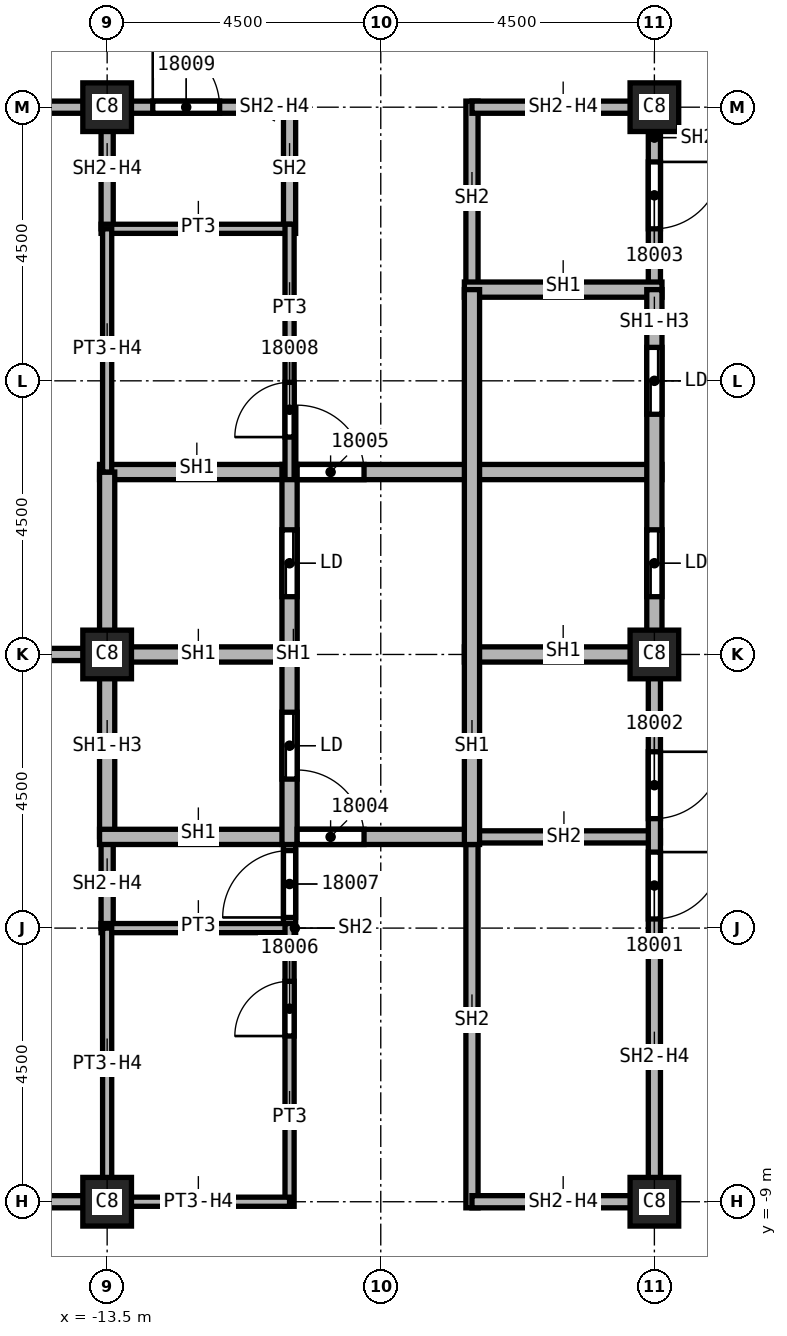
"""IFC4 building model, lengths in metres.
Left out: names, types, materials, properties, quantities, classifications, styles, units other than length and angle.
Written with IfcOpenShell. Run it as: python <this file> out.ifc"""

import sys

from ifc_helpers import new_model, si_unit, direction, frame, frame_2d, origin, origin_2d, place, context, subcontext, project, spatial, rectangle, extrude, element, fill, save


model = new_model("IFC4")
c1 = context("Model", 3, precision=1e-05, world=origin(), true_north=direction((0.0, 1.0)))
c2 = subcontext(c1, "Body", "Model", "MODEL_VIEW")
j1 = project(units=[si_unit("LENGTHUNIT", "METRE"), si_unit("PLANEANGLEUNIT", "RADIAN")], contexts=[c1])
p1 = place(None, origin())
s1 = spatial("IfcSite", under=j1, at=p1, CompositionType="ELEMENT")
p2 = place(p1, origin())
s2 = spatial("IfcBuilding", under=s1, at=p2, CompositionType="ELEMENT")
p3 = place(p2, frame((0.0, 0.0, 266.0)))
s3 = spatial("IfcBuildingStorey", under=s2, at=p3, CompositionType="ELEMENT", Elevation=266.0)
for number, where, z_axis, x_axis in (
    (1, (-4.5, 0.0, 0.0), (0.0, 0.0, 1.0), (1.0, 0.0, 0.0)),
    (2, (-4.5, 9.0, 0.0), (0.0, 0.0, 1.0), (1.0, 0.0, 0.0)),
    (3, (-4.5, -9.0, 0.0), (0.0, 0.0, 1.0), (1.0, 0.0, 0.0)),
    (4, (-13.5, 0.0, 0.0), (0.0, 0.0, 1.0), (1.0, 0.0, 0.0)),
    (5, (-13.5, 9.0, 0.0), (0.0, 0.0, 1.0), (1.0, 0.0, 0.0)),
    (6, (-13.5, -9.0, 0.0), (0.0, 0.0, 1.0), (1.0, 0.0, 0.0)),
):
    element("IfcColumn", number, at=place(p3, frame(where, z_axis=z_axis, x_axis=x_axis)), inside=s3, PredefinedType="COLUMN", context=c2, shape_type="SweptSolid", body=[
        extrude(rectangle(XDim=0.8, YDim=0.8, at=origin_2d()), origin(), (0.0, 0.0, 1.0), 3.72),
    ])
for number, where, z_axis, x_axis in (
    (7, (-18.0, -9.0, 0.0), (0.0, 0.0, 1.0), (1.0, 0.0, 0.0)),
    (8, (-18.0, 0.0, 0.0), (0.0, 0.0, 1.0), (1.0, 0.0, 0.0)),
    (9, (-13.5, 9.0, 0.0), (0.0, 0.0, 1.0), (-1.0, 0.0, 0.0)),
):
    element("IfcWall", number, at=place(p3, frame(where, z_axis=z_axis, x_axis=x_axis)), inside=s3, PredefinedType="PARTITIONING", context=c2, shape_type="SweptSolid", body=[
        extrude(rectangle(XDim=4.5, YDim=0.2, at=frame_2d((2.25, 0.0))), origin(), (0.0, 0.0, 1.0), 3.72),
    ])
p4 = place(p3, frame((-13.6, 9.0, 0.0), z_axis=(0.0, 0.0, 1.0), x_axis=(1.0, 0.0, 0.0)))
e10 = element("IfcWall", 10, at=p4, inside=s3, PredefinedType="SOLIDWALL", context=c2, shape_type="SweptSolid", body=[
    extrude(rectangle(XDim=3.1, YDim=0.2, at=frame_2d((1.55, 0.0))), origin(), (0.0, 0.0, 1.0), 3.042),
])
p5 = place(p4, frame((0.85, 0.0, 0.0)))
e11 = element("IfcOpeningElement", 11, at=p5, cuts=e10, PredefinedType="OPENING", context=c2, shape_type="SweptSolid", body=[
    extrude(rectangle(XDim=1.1, YDim=2.1, at=frame_2d((0.55, 1.05))), frame((0.0, 0.1, 0.0), z_axis=(0.0, -1.0, 0.0), x_axis=(1.0, 0.0, 0.0)), (0.0, 0.0, 1.0), 0.2),
])
p6 = place(p3, frame((-13.5, -4.5, 0.0), z_axis=(0.0, 0.0, 1.0), x_axis=(0.0, 1.0, 0.0)))
e12 = element("IfcWall", 12, at=p6, inside=s3, PredefinedType="SOLIDWALL", context=c2, shape_type="SweptSolid", body=[
    extrude(rectangle(XDim=1.5, YDim=0.2, at=frame_2d((0.75, 0.0))), origin(), (0.0, 0.0, 1.0), 3.042),
])
p7 = place(p3, frame((-13.5, 7.0, 0.0), z_axis=(0.0, 0.0, 1.0), x_axis=(0.0, 1.0, 0.0)))
e13 = element("IfcWall", 13, at=p7, inside=s3, PredefinedType="SOLIDWALL", context=c2, shape_type="SweptSolid", body=[
    extrude(rectangle(XDim=2.1, YDim=0.2, at=frame_2d((1.05, 0.0))), origin(), (0.0, 0.0, 1.0), 3.042),
])
p8 = place(p3, frame((-10.5, -4.575, 0.0), z_axis=(0.0, 0.0, 1.0), x_axis=(0.0, 1.0, 0.0)))
e14 = element("IfcWall", 14, at=p8, inside=s3, PredefinedType="SOLIDWALL", context=c2, shape_type="SweptSolid", body=[
    extrude(rectangle(XDim=1.7, YDim=0.2, at=frame_2d((0.85, 0.0))), origin(), (0.0, 0.0, 1.0), 3.72),
])
p9 = place(p8, frame((0.25, 0.0, 0.0)))
e15 = element("IfcOpeningElement", 15, at=p9, cuts=e14, PredefinedType="OPENING", context=c2, shape_type="SweptSolid", body=[
    extrude(rectangle(XDim=1.1, YDim=2.1, at=frame_2d((0.55, 1.05))), frame((0.0, 0.1, 0.0), z_axis=(0.0, -1.0, 0.0), x_axis=(1.0, 0.0, 0.0)), (0.0, 0.0, 1.0), 0.2),
])
p10 = place(p3, frame((-10.5, 6.925, 0.0), z_axis=(0.0, 0.0, 1.0), x_axis=(0.0, 1.0, 0.0)))
e16 = element("IfcWall", 16, at=p10, inside=s3, PredefinedType="SOLIDWALL", context=c2, shape_type="SweptSolid", body=[
    extrude(rectangle(XDim=2.175, YDim=0.2, at=frame_2d((1.087, 0.0))), origin(), (0.0, 0.0, 1.0), 3.72),
])
p11 = place(p3, frame((-7.625, -3.0, 0.0), z_axis=(0.0, 0.0, 1.0), x_axis=(1.0, 0.0, 0.0)))
e17 = element("IfcWall", 17, at=p11, inside=s3, PredefinedType="SOLIDWALL", context=c2, shape_type="SweptSolid", body=[
    extrude(rectangle(XDim=3.225, YDim=0.2, at=frame_2d((1.613, 0.0))), origin(), (0.0, 0.0, 1.0), 3.72),
])
p12 = place(p3, frame((-7.5, -9.1, 0.0), z_axis=(0.0, 0.0, 1.0), x_axis=(0.0, 1.0, 0.0)))
e18 = element("IfcWall", 18, at=p12, inside=s3, PredefinedType="SOLIDWALL", context=c2, shape_type="SweptSolid", body=[
    extrude(rectangle(XDim=6.225, YDim=0.2, at=frame_2d((3.113, 0.0))), origin(), (0.0, 0.0, 1.0), 3.72),
])
p13 = place(p3, frame((-7.5, 6.0, 0.0), z_axis=(0.0, 0.0, 1.0), x_axis=(0.0, 1.0, 0.0)))
e19 = element("IfcWall", 19, at=p13, inside=s3, PredefinedType="SOLIDWALL", context=c2, shape_type="SweptSolid", body=[
    extrude(rectangle(XDim=3.1, YDim=0.2, at=frame_2d((1.55, 0.0))), origin(), (0.0, 0.0, 1.0), 3.72),
])
for number, where, z_axis, x_axis in (
    (20, (-7.5, 9.0, 0.0), (0.0, 0.0, 1.0), (1.0, 0.0, 0.0)),
    (21, (-4.5, -9.0, 0.0), (0.0, 0.0, 1.0), (-1.0, 0.0, 0.0)),
):
    element("IfcWall", number, at=place(p3, frame(where, z_axis=z_axis, x_axis=x_axis)), inside=s3, PredefinedType="SOLIDWALL", context=c2, shape_type="SweptSolid", body=[
        extrude(rectangle(XDim=3.0, YDim=0.2, at=frame_2d((1.5, 0.0))), origin(), (0.0, 0.0, 1.0), 3.042),
    ])
p14 = place(p3, frame((-4.5, 0.0, 0.0), z_axis=(0.0, 0.0, 1.0), x_axis=(0.0, -1.0, 0.0)))
e22 = element("IfcWall", 22, at=p14, inside=s3, PredefinedType="SOLIDWALL", context=c2, shape_type="SweptSolid", body=[
    extrude(rectangle(XDim=9.1, YDim=0.2, at=frame_2d((4.55, 0.0))), origin(), (0.0, 0.0, 1.0), 3.042),
])
p15 = place(p14, frame((3.25, 0.0, 0.0)))
e23 = element("IfcOpeningElement", 23, at=p15, cuts=e22, PredefinedType="OPENING", context=c2, shape_type="SweptSolid", body=[
    extrude(rectangle(XDim=1.1, YDim=2.1, at=frame_2d((0.55, 1.05))), frame((0.0, 0.1, 0.0), z_axis=(0.0, -1.0, 0.0), x_axis=(1.0, 0.0, 0.0)), (0.0, 0.0, 1.0), 0.2),
])
p16 = place(p14, frame((1.6, 0.0, 0.0)))
e24 = element("IfcOpeningElement", 24, at=p16, cuts=e22, PredefinedType="OPENING", context=c2, shape_type="SweptSolid", body=[
    extrude(rectangle(XDim=1.1, YDim=2.1, at=frame_2d((0.55, 1.05))), frame((0.0, 0.1, 0.0), z_axis=(0.0, -1.0, 0.0), x_axis=(1.0, 0.0, 0.0)), (0.0, 0.0, 1.0), 0.2),
])
p17 = place(p3, frame((-4.5, 9.1, 0.0), z_axis=(0.0, 0.0, 1.0), x_axis=(0.0, -1.0, 0.0)))
e25 = element("IfcWall", 25, at=p17, inside=s3, PredefinedType="SOLIDWALL", context=c2, shape_type="SweptSolid", body=[
    extrude(rectangle(XDim=3.1, YDim=0.2, at=frame_2d((1.55, 0.0))), origin(), (0.0, 0.0, 1.0), 3.042),
])
p18 = place(p17, frame((1.0, 0.0, 0.0)))
e26 = element("IfcOpeningElement", 26, at=p18, cuts=e25, PredefinedType="OPENING", context=c2, shape_type="SweptSolid", body=[
    extrude(rectangle(XDim=1.1, YDim=2.1, at=frame_2d((0.55, 1.05))), frame((0.0, 0.1, 0.0), z_axis=(0.0, -1.0, 0.0), x_axis=(1.0, 0.0, 0.0)), (0.0, 0.0, 1.0), 0.2),
])
p19 = place(p3, frame((-13.625, 0.0, 0.0), z_axis=(0.0, 0.0, 1.0), x_axis=(1.0, 0.0, 0.0)))
e27 = element("IfcWall", 27, at=p19, inside=s3, PredefinedType="SOLIDWALL", context=c2, shape_type="SweptSolid", body=[
    extrude(rectangle(XDim=3.125, YDim=0.25, at=frame_2d((1.562, 0.0))), origin(), (0.0, 0.0, 1.0), 3.72),
])
p20 = place(p3, frame((-13.625, 3.0, 0.0), z_axis=(0.0, 0.0, 1.0), x_axis=(1.0, 0.0, 0.0)))
e28 = element("IfcWall", 28, at=p20, inside=s3, PredefinedType="SOLIDWALL", context=c2, shape_type="SweptSolid", body=[
    extrude(rectangle(XDim=9.25, YDim=0.25, at=frame_2d((4.625, 0.0))), origin(), (0.0, 0.0, 1.0), 3.72),
])
p21 = place(p20, frame((3.25, 0.0, 0.0)))
e29 = element("IfcOpeningElement", 29, at=p21, cuts=e28, PredefinedType="OPENING", context=c2, shape_type="SweptSolid", body=[
    extrude(rectangle(XDim=1.1, YDim=2.1, at=frame_2d((0.55, 1.05))), frame((0.0, 0.125, 0.0), z_axis=(0.0, -1.0, 0.0), x_axis=(1.0, 0.0, 0.0)), (0.0, 0.0, 1.0), 0.25),
])
p22 = place(p3, frame((-13.5, -3.0, 0.0), z_axis=(0.0, 0.0, 1.0), x_axis=(0.0, 1.0, 0.0)))
e30 = element("IfcWall", 30, at=p22, inside=s3, PredefinedType="SOLIDWALL", context=c2, shape_type="SweptSolid", body=[
    extrude(rectangle(XDim=6.0, YDim=0.25, at=frame_2d((3.0, 0.0))), origin(), (0.0, 0.0, 1.0), 3.042),
])
p23 = place(p3, frame((-13.625, -3.0, 0.0), z_axis=(0.0, 0.0, 1.0), x_axis=(1.0, 0.0, 0.0)))
e31 = element("IfcWall", 31, at=p23, inside=s3, PredefinedType="SOLIDWALL", context=c2, shape_type="SweptSolid", body=[
    extrude(rectangle(XDim=6.125, YDim=0.25, at=frame_2d((3.062, 0.0))), origin(), (0.0, 0.0, 1.0), 3.72),
])
p24 = place(p23, frame((3.25, 0.0, 0.0)))
e32 = element("IfcOpeningElement", 32, at=p24, cuts=e31, PredefinedType="OPENING", context=c2, shape_type="SweptSolid", body=[
    extrude(rectangle(XDim=1.1, YDim=2.1, at=frame_2d((0.55, 1.05))), frame((0.0, 0.125, 0.0), z_axis=(0.0, -1.0, 0.0), x_axis=(1.0, 0.0, 0.0)), (0.0, 0.0, 1.0), 0.25),
])
p25 = place(p3, frame((-10.5, -3.125, 0.0), z_axis=(0.0, 0.0, 1.0), x_axis=(0.0, 1.0, 0.0)))
e33 = element("IfcWall", 33, at=p25, inside=s3, PredefinedType="SOLIDWALL", context=c2, shape_type="SweptSolid", body=[
    extrude(rectangle(XDim=6.25, YDim=0.25, at=frame_2d((3.125, 0.0))), origin(), (0.0, 0.0, 1.0), 3.72),
])
p26 = place(p25, frame((1.075, 0.0, 0.0)))
e34 = element("IfcOpeningElement", 34, at=p26, cuts=e33, PredefinedType="OPENING", context=c2, shape_type="SweptSolid", body=[
    extrude(rectangle(XDim=1.1, YDim=2.1, at=frame_2d((0.55, 1.05))), frame((0.0, 0.125, 0.0), z_axis=(0.0, -1.0, 0.0), x_axis=(1.0, 0.0, 0.0)), (0.0, 0.0, 1.0), 0.25),
])
p27 = place(p25, frame((4.075, 0.0, 0.0)))
e35 = element("IfcOpeningElement", 35, at=p27, cuts=e33, PredefinedType="OPENING", context=c2, shape_type="SweptSolid", body=[
    extrude(rectangle(XDim=1.1, YDim=2.1, at=frame_2d((0.55, 1.05))), frame((0.0, 0.125, 0.0), z_axis=(0.0, -1.0, 0.0), x_axis=(1.0, 0.0, 0.0)), (0.0, 0.0, 1.0), 0.25),
])
for number, where, z_axis, x_axis in (
    (36, (-7.625, 0.0, 0.0), (0.0, 0.0, 1.0), (1.0, 0.0, 0.0)),
    (37, (-7.625, 6.0, 0.0), (0.0, 0.0, 1.0), (1.0, 0.0, 0.0)),
):
    element("IfcWall", number, at=place(p3, frame(where, z_axis=z_axis, x_axis=x_axis)), inside=s3, PredefinedType="SOLIDWALL", context=c2, shape_type="SweptSolid", body=[
        extrude(rectangle(XDim=3.25, YDim=0.25, at=frame_2d((1.625, 0.0))), origin(), (0.0, 0.0, 1.0), 3.72),
    ])
p28 = place(p3, frame((-7.5, -3.125, 0.0), z_axis=(0.0, 0.0, 1.0), x_axis=(0.0, 1.0, 0.0)))
e38 = element("IfcWall", 38, at=p28, inside=s3, PredefinedType="SOLIDWALL", context=c2, shape_type="SweptSolid", body=[
    extrude(rectangle(XDim=9.125, YDim=0.25, at=frame_2d((4.562, 0.0))), origin(), (0.0, 0.0, 1.0), 3.72),
])
p29 = place(p3, frame((-4.5, 6.0, 0.0), z_axis=(0.0, 0.0, 1.0), x_axis=(0.0, -1.0, 0.0)))
e39 = element("IfcWall", 39, at=p29, inside=s3, PredefinedType="SOLIDWALL", context=c2, shape_type="SweptSolid", body=[
    extrude(rectangle(XDim=6.0, YDim=0.25, at=frame_2d((3.0, 0.0))), origin(), (0.0, 0.0, 1.0), 3.042),
])
p30 = place(p29, frame((3.95, 0.0, 0.0)))
e40 = element("IfcOpeningElement", 40, at=p30, cuts=e39, PredefinedType="OPENING", context=c2, shape_type="SweptSolid", body=[
    extrude(rectangle(XDim=1.1, YDim=2.1, at=frame_2d((0.55, 1.05))), frame((0.0, 0.125, 0.0), z_axis=(0.0, -1.0, 0.0), x_axis=(1.0, 0.0, 0.0)), (0.0, 0.0, 1.0), 0.25),
])
p31 = place(p29, frame((0.95, 0.0, 0.0)))
e41 = element("IfcOpeningElement", 41, at=p31, cuts=e39, PredefinedType="OPENING", context=c2, shape_type="SweptSolid", body=[
    extrude(rectangle(XDim=1.1, YDim=2.1, at=frame_2d((0.55, 1.05))), frame((0.0, 0.125, 0.0), z_axis=(0.0, -1.0, 0.0), x_axis=(1.0, 0.0, 0.0)), (0.0, 0.0, 1.0), 0.25),
])
for number, where, z_axis, x_axis in (
    (42, (-13.6, -4.5, 0.0), (0.0, 0.0, 1.0), (1.0, 0.0, 0.0)),
    (43, (-13.6, 7.0, 0.0), (0.0, 0.0, 1.0), (1.0, 0.0, 0.0)),
):
    element("IfcWall", number, at=place(p3, frame(where, z_axis=z_axis, x_axis=x_axis)), inside=s3, PredefinedType="PARTITIONING", context=c2, shape_type="SweptSolid", body=[
        extrude(rectangle(XDim=3.1, YDim=0.15, at=frame_2d((1.55, 0.0))), origin(), (0.0, 0.0, 1.0), 3.72),
    ])
p32 = place(p3, frame((-13.5, -9.1, 0.0), z_axis=(0.0, 0.0, 1.0), x_axis=(0.0, 1.0, 0.0)))
e44 = element("IfcWall", 44, at=p32, inside=s3, PredefinedType="PARTITIONING", context=c2, shape_type="SweptSolid", body=[
    extrude(rectangle(XDim=4.6, YDim=0.15, at=frame_2d((2.3, 0.0))), origin(), (0.0, 0.0, 1.0), 3.042),
])
p33 = place(p3, frame((-13.5, 3.0, 0.0), z_axis=(0.0, 0.0, 1.0), x_axis=(0.0, 1.0, 0.0)))
e45 = element("IfcWall", 45, at=p33, inside=s3, PredefinedType="PARTITIONING", context=c2, shape_type="SweptSolid", body=[
    extrude(rectangle(XDim=4.0, YDim=0.15, at=frame_2d((2.0, 0.0))), origin(), (0.0, 0.0, 1.0), 3.042),
])
p34 = place(p3, frame((-10.5, -9.075, 0.0), z_axis=(0.0, 0.0, 1.0), x_axis=(0.0, 1.0, 0.0)))
e46 = element("IfcWall", 46, at=p34, inside=s3, PredefinedType="PARTITIONING", context=c2, shape_type="SweptSolid", body=[
    extrude(rectangle(XDim=4.65, YDim=0.15, at=frame_2d((2.325, 0.0))), origin(), (0.0, 0.0, 1.0), 3.72),
])
p35 = place(p34, frame((2.8, 0.0, 0.0)))
e47 = element("IfcOpeningElement", 47, at=p35, cuts=e46, PredefinedType="OPENING", context=c2, shape_type="SweptSolid", body=[
    extrude(rectangle(XDim=0.9, YDim=2.1, at=frame_2d((0.45, 1.05))), frame((0.0, 0.075, 0.0), z_axis=(0.0, -1.0, 0.0), x_axis=(1.0, 0.0, 0.0)), (0.0, 0.0, 1.0), 0.15),
])
p36 = place(p3, frame((-10.5, -9.0, 0.0), z_axis=(0.0, 0.0, 1.0), x_axis=(-1.0, 0.0, 0.0)))
e48 = element("IfcWall", 48, at=p36, inside=s3, PredefinedType="PARTITIONING", context=c2, shape_type="SweptSolid", body=[
    extrude(rectangle(XDim=3.075, YDim=0.15, at=frame_2d((1.538, 0.0))), origin(), (0.0, 0.0, 1.0), 3.042),
])
p37 = place(p3, frame((-10.5, 2.875, 0.0), z_axis=(0.0, 0.0, 1.0), x_axis=(0.0, 1.0, 0.0)))
e49 = element("IfcWall", 49, at=p37, inside=s3, PredefinedType="PARTITIONING", context=c2, shape_type="SweptSolid", body=[
    extrude(rectangle(XDim=4.2, YDim=0.15, at=frame_2d((2.1, 0.0))), origin(), (0.0, 0.0, 1.0), 3.72),
])
p38 = place(p37, frame((0.7, 0.0, 0.0)))
e50 = element("IfcOpeningElement", 50, at=p38, cuts=e49, PredefinedType="OPENING", context=c2, shape_type="SweptSolid", body=[
    extrude(rectangle(XDim=0.9, YDim=2.1, at=frame_2d((0.45, 1.05))), frame((0.0, 0.075, 0.0), z_axis=(0.0, -1.0, 0.0), x_axis=(1.0, 0.0, 0.0)), (0.0, 0.0, 1.0), 0.15),
])
p39 = place(p15, origin())
e51 = element("IfcDoor", 51, at=p39, inside=s3, OperationType="SINGLE_SWING_RIGHT", PredefinedType="DOOR", context=c2, shape_type="SweptSolid", body=[
    extrude(rectangle(XDim=1.1, YDim=2.1, at=frame_2d((0.55, 1.05))), frame((0.0, 0.025, 0.0), z_axis=(0.0, -1.0, 0.0), x_axis=(1.0, 0.0, 0.0)), (0.0, 0.0, 1.0), 0.05),
])
fill(e23, e51)
p40 = place(p16, origin())
e52 = element("IfcDoor", 52, at=p40, inside=s3, OperationType="SINGLE_SWING_LEFT", PredefinedType="DOOR", context=c2, shape_type="SweptSolid", body=[
    extrude(rectangle(XDim=1.1, YDim=2.1, at=frame_2d((0.55, 1.05))), frame((0.0, 0.025, 0.0), z_axis=(0.0, -1.0, 0.0), x_axis=(1.0, 0.0, 0.0)), (0.0, 0.0, 1.0), 0.05),
])
fill(e24, e52)
p41 = place(p18, origin())
e53 = element("IfcDoor", 53, at=p41, inside=s3, OperationType="SINGLE_SWING_RIGHT", PredefinedType="DOOR", context=c2, shape_type="SweptSolid", body=[
    extrude(rectangle(XDim=1.1, YDim=2.1, at=frame_2d((0.55, 1.05))), frame((0.0, 0.025, 0.0), z_axis=(0.0, -1.0, 0.0), x_axis=(1.0, 0.0, 0.0)), (0.0, 0.0, 1.0), 0.05),
])
fill(e26, e53)
p42 = place(p24, origin())
e54 = element("IfcDoor", 54, at=p42, inside=s3, OperationType="SINGLE_SWING_LEFT", PredefinedType="DOOR", context=c2, shape_type="SweptSolid", body=[
    extrude(rectangle(XDim=1.1, YDim=2.1, at=frame_2d((0.55, 1.05))), frame((0.0, 0.025, 0.0), z_axis=(0.0, -1.0, 0.0), x_axis=(1.0, 0.0, 0.0)), (0.0, 0.0, 1.0), 0.05),
])
fill(e32, e54)
p43 = place(p21, origin())
e55 = element("IfcDoor", 55, at=p43, inside=s3, OperationType="SINGLE_SWING_RIGHT", PredefinedType="DOOR", context=c2, shape_type="SweptSolid", body=[
    extrude(rectangle(XDim=1.1, YDim=2.1, at=frame_2d((0.55, 1.05))), frame((0.0, 0.025, 0.0), z_axis=(0.0, -1.0, 0.0), x_axis=(1.0, 0.0, 0.0)), (0.0, 0.0, 1.0), 0.05),
])
fill(e29, e55)
p44 = place(p35, origin())
e56 = element("IfcDoor", 56, at=p44, inside=s3, OperationType="SINGLE_SWING_LEFT", PredefinedType="DOOR", context=c2, shape_type="SweptSolid", body=[
    extrude(rectangle(XDim=0.9, YDim=2.1, at=frame_2d((0.45, 1.05))), frame((0.0, 0.025, 0.0), z_axis=(0.0, -1.0, 0.0), x_axis=(1.0, 0.0, 0.0)), (0.0, 0.0, 1.0), 0.05),
])
fill(e47, e56)
p45 = place(p9, origin())
e57 = element("IfcDoor", 57, at=p45, inside=s3, OperationType="SINGLE_SWING_RIGHT", PredefinedType="DOOR", context=c2, shape_type="SweptSolid", body=[
    extrude(rectangle(XDim=1.1, YDim=2.1, at=frame_2d((0.55, 1.05))), frame((0.0, 0.025, 0.0), z_axis=(0.0, -1.0, 0.0), x_axis=(1.0, 0.0, 0.0)), (0.0, 0.0, 1.0), 0.05),
])
fill(e15, e57)
p46 = place(p38, origin())
e58 = element("IfcDoor", 58, at=p46, inside=s3, OperationType="SINGLE_SWING_LEFT", PredefinedType="DOOR", context=c2, shape_type="SweptSolid", body=[
    extrude(rectangle(XDim=0.9, YDim=2.1, at=frame_2d((0.45, 1.05))), frame((0.0, 0.025, 0.0), z_axis=(0.0, -1.0, 0.0), x_axis=(1.0, 0.0, 0.0)), (0.0, 0.0, 1.0), 0.05),
])
fill(e50, e58)
p47 = place(p5, origin())
e59 = element("IfcDoor", 59, at=p47, inside=s3, OperationType="SINGLE_SWING_RIGHT", PredefinedType="DOOR", context=c2, shape_type="SweptSolid", body=[
    extrude(rectangle(XDim=1.1, YDim=2.1, at=frame_2d((0.55, 1.05))), frame((0.0, 0.025, 0.0), z_axis=(0.0, -1.0, 0.0), x_axis=(1.0, 0.0, 0.0)), (0.0, 0.0, 1.0), 0.05),
])
fill(e11, e59)
p48 = place(p30, origin())
e60 = element("IfcDoor", 60, at=p48, inside=s3, OperationType="SLIDING_TO_LEFT", PredefinedType="DOOR", context=c2, shape_type="SweptSolid", body=[
    extrude(rectangle(XDim=1.1, YDim=2.1, at=frame_2d((0.55, 1.05))), frame((0.0, 0.025, 0.0), z_axis=(0.0, -1.0, 0.0), x_axis=(1.0, 0.0, 0.0)), (0.0, 0.0, 1.0), 0.05),
])
fill(e40, e60)
p49 = place(p31, origin())
e61 = element("IfcDoor", 61, at=p49, inside=s3, OperationType="SLIDING_TO_LEFT", PredefinedType="DOOR", context=c2, shape_type="SweptSolid", body=[
    extrude(rectangle(XDim=1.1, YDim=2.1, at=frame_2d((0.55, 1.05))), frame((0.0, 0.025, 0.0), z_axis=(0.0, -1.0, 0.0), x_axis=(1.0, 0.0, 0.0)), (0.0, 0.0, 1.0), 0.05),
])
fill(e41, e61)
p50 = place(p26, origin())
e62 = element("IfcDoor", 62, at=p50, inside=s3, OperationType="SLIDING_TO_LEFT", PredefinedType="DOOR", context=c2, shape_type="SweptSolid", body=[
    extrude(rectangle(XDim=1.1, YDim=2.1, at=frame_2d((0.55, 1.05))), frame((0.0, 0.025, 0.0), z_axis=(0.0, -1.0, 0.0), x_axis=(1.0, 0.0, 0.0)), (0.0, 0.0, 1.0), 0.05),
])
fill(e34, e62)
p51 = place(p27, origin())
e63 = element("IfcDoor", 63, at=p51, inside=s3, OperationType="SLIDING_TO_LEFT", PredefinedType="DOOR", context=c2, shape_type="SweptSolid", body=[
    extrude(rectangle(XDim=1.1, YDim=2.1, at=frame_2d((0.55, 1.05))), frame((0.0, 0.025, 0.0), z_axis=(0.0, -1.0, 0.0), x_axis=(1.0, 0.0, 0.0)), (0.0, 0.0, 1.0), 0.05),
])
fill(e35, e63)
save(model, sys.argv[1])
